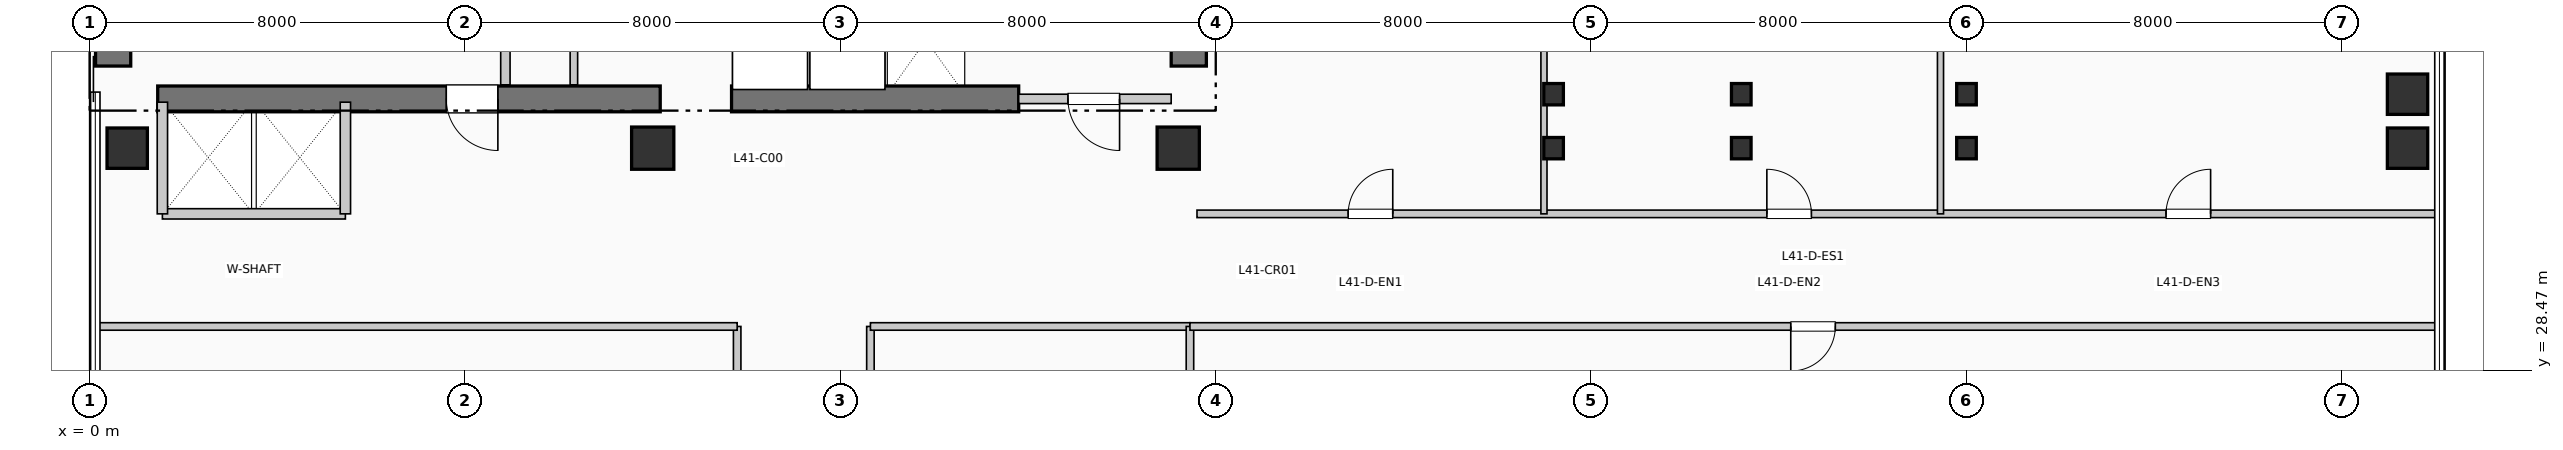
"""IFC4 building model, lengths in metres.
Left out: names, types, materials, properties, quantities, classifications, styles, units other than length and angle.
Written with IfcOpenShell. Run it as: python <this file> out.ifc"""

import sys

from ifc_helpers import new_model, si_unit, direction, frame, frame_2d, origin, origin_2d, place, context, subcontext, project, spatial, rectangle, i_section, extrude, element, fill, save


model = new_model("IFC4")
c1 = context("Model", 3, precision=1e-05, world=origin(), true_north=direction((0.0, 1.0)))
c2 = subcontext(c1, "Body", "Model", "MODEL_VIEW")
j1 = project(units=[si_unit("LENGTHUNIT", "METRE"), si_unit("PLANEANGLEUNIT", "RADIAN")], contexts=[c1])
p1 = place(None, origin())
s1 = spatial("IfcSite", under=j1, at=p1, CompositionType="ELEMENT")
p2 = place(p1, origin())
s2 = spatial("IfcBuilding", under=s1, at=p2, CompositionType="ELEMENT")
p3 = place(p2, frame((0.0, 0.0, 170.61)))
s3 = spatial("IfcBuildingStorey", under=s2, at=p3, CompositionType="ELEMENT", Elevation=170.61)
p4 = place(p3, frame((0.5, 34.95, 0.0), z_axis=(0.0, 0.0, 1.0), x_axis=(0.0, 1.0, 0.0)))
e1 = element("IfcWall", 1, at=p4, inside=s3, PredefinedType="SHEAR", context=c2, shape_type="SweptSolid", body=[
    extrude(rectangle(XDim=7.9, YDim=0.75, at=frame_2d((3.95, 0.0))), origin(), (0.0, 0.0, 1.0), 3.96),
])
p5 = place(p3, frame((23.425, 34.95, 0.0), z_axis=(0.0, 0.0, 1.0), x_axis=(0.0, 1.0, 0.0)))
e2 = element("IfcWall", 2, at=p5, inside=s3, PredefinedType="SHEAR", context=c2, shape_type="SweptSolid", body=[
    extrude(rectangle(XDim=10.64, YDim=0.75, at=frame_2d((5.32, 0.0))), origin(), (0.0, 0.0, 1.0), 3.96),
])
p6 = place(p3, frame((1.45, 34.25, 0.0), z_axis=(0.0, 0.0, 1.0), x_axis=(1.0, 0.0, 0.0)))
e3 = element("IfcWall", 3, at=p6, inside=s3, PredefinedType="SHEAR", context=c2, shape_type="SweptSolid", body=[
    extrude(rectangle(XDim=10.71, YDim=0.55, at=frame_2d((5.355, 0.0))), origin(), (0.0, 0.0, 1.0), 3.96),
])
p7 = place(p6, frame((7.25, 0.0, 0.0), z_axis=(0.0, 0.0, 1.0), x_axis=(-1.0, 0.0, 0.0)))
e4 = element("IfcOpeningElement", 4, at=p7, cuts=e3, PredefinedType="OPENING", context=c2, shape_type="SweptSolid", body=[
    extrude(rectangle(XDim=1.1, YDim=2.15, at=frame_2d((0.55, 1.075))), frame((0.0, 0.285, 0.0), z_axis=(0.0, -1.0, 0.0), x_axis=(1.0, 0.0, 0.0)), (0.0, 0.0, 1.0), 0.57),
])
p8 = place(p3, frame((13.68, 34.25, 0.0), z_axis=(0.0, 0.0, 1.0), x_axis=(1.0, 0.0, 0.0)))
e5 = element("IfcWall", 5, at=p8, inside=s3, PredefinedType="SHEAR", context=c2, shape_type="SweptSolid", body=[
    extrude(rectangle(XDim=6.12, YDim=0.55, at=frame_2d((3.06, 0.0))), origin(), (0.0, 0.0, 1.0), 3.96),
])
p9 = place(p3, frame((0.8, 33.2, 0.0), z_axis=(0.0, 0.0, 1.0), x_axis=(1.0, 0.0, 0.0)))
e6 = element("IfcColumn", 6, at=p9, inside=s3, PredefinedType="COLUMN", context=c2, shape_type="SweptSolid", body=[
    extrude(rectangle(XDim=0.86, YDim=0.86, at=origin_2d()), origin(), (0.0, 0.0, 1.0), 3.96),
])
for number, where, z_axis, x_axis in (
    (7, (12.0, 33.2, 0.0), (0.0, 0.0, 1.0), (1.0, 0.0, 0.0)),
    (8, (23.2, 33.2, 0.0), (0.0, 0.0, 1.0), (1.0, 0.0, 0.0)),
):
    element("IfcColumn", number, at=place(p3, frame(where, z_axis=z_axis, x_axis=x_axis)), inside=s3, PredefinedType="COLUMN", context=c2, shape_type="SweptSolid", body=[
        extrude(rectangle(XDim=0.9, YDim=0.9, at=origin_2d()), origin(), (0.0, 0.0, 1.0), 3.96),
    ])
for number, where, z_axis, x_axis in (
    (9, (31.2, 33.2, 0.0), (0.0, 0.0, 1.0), (1.0, 0.0, 0.0)),
    (10, (31.2, 34.35, 0.0), (0.0, 0.0, 1.0), (1.0, 0.0, 0.0)),
    (11, (35.2, 33.2, 0.0), (0.0, 0.0, 1.0), (1.0, 0.0, 0.0)),
    (12, (35.2, 34.35, 0.0), (0.0, 0.0, 1.0), (1.0, 0.0, 0.0)),
    (13, (40.0, 33.2, 0.0), (0.0, 0.0, 1.0), (1.0, 0.0, 0.0)),
    (14, (40.0, 34.35, 0.0), (0.0, 0.0, 1.0), (1.0, 0.0, 0.0)),
):
    element("IfcColumn", number, at=place(p3, frame(where, z_axis=z_axis, x_axis=x_axis)), inside=s3, PredefinedType="COLUMN", context=c2, shape_type="SweptSolid", body=[
        extrude(i_section(OverallWidth=0.418, OverallDepth=0.455, WebThickness=0.032, FlangeThickness=0.051, at=origin_2d()), origin(), (0.0, 0.0, 1.0), 3.96),
    ])
for number, where, z_axis, x_axis in (
    (15, (49.4, 33.2, 0.0), (0.0, 0.0, 1.0), (1.0, 0.0, 0.0)),
    (16, (49.4, 34.35, 0.0), (0.0, 0.0, 1.0), (1.0, 0.0, 0.0)),
):
    element("IfcColumn", number, at=place(p3, frame(where, z_axis=z_axis, x_axis=x_axis)), inside=s3, PredefinedType="COLUMN", context=c2, shape_type="SweptSolid", body=[
        extrude(rectangle(XDim=0.86, YDim=0.86, at=origin_2d()), origin(), (0.0, 0.0, 1.0), 3.96),
    ])
p10 = place(p3, frame((8.86, 34.55, 0.0), z_axis=(0.0, 0.0, 1.0), x_axis=(0.0, 1.0, 0.0)))
e17 = element("IfcWall", 17, at=p10, inside=s3, PredefinedType="PARTITIONING", context=c2, shape_type="SweptSolid", body=[
    extrude(rectangle(XDim=2.5, YDim=0.2, at=frame_2d((1.25, 0.0))), origin(), (0.0, 0.0, 1.0), 3.61),
])
p11 = place(p3, frame((19.8, 34.25, 0.0), z_axis=(0.0, 0.0, 1.0), x_axis=(1.0, 0.0, 0.0)))
e18 = element("IfcWall", 18, at=p11, inside=s3, PredefinedType="PARTITIONING", context=c2, shape_type="SweptSolid", body=[
    extrude(rectangle(XDim=3.25, YDim=0.2, at=frame_2d((1.625, 0.0))), origin(), (0.0, 0.0, 1.0), 3.61),
])
p12 = place(p11, frame((2.15, 0.0, 0.0), z_axis=(0.0, 0.0, 1.0), x_axis=(-1.0, 0.0, 0.0)))
e19 = element("IfcOpeningElement", 19, at=p12, cuts=e18, PredefinedType="OPENING", context=c2, shape_type="SweptSolid", body=[
    extrude(rectangle(XDim=1.1, YDim=2.15, at=frame_2d((0.55, 1.075))), frame((0.0, 0.11, 0.0), z_axis=(0.0, -1.0, 0.0), x_axis=(1.0, 0.0, 0.0)), (0.0, 0.0, 1.0), 0.22),
])
p13 = place(p3, frame((1.55, 31.8, 0.0), z_axis=(0.0, 0.0, 1.0), x_axis=(1.0, 0.0, 0.0)))
e20 = element("IfcWall", 20, at=p13, inside=s3, PredefinedType="PARTITIONING", context=c2, shape_type="SweptSolid", body=[
    extrude(rectangle(XDim=3.9, YDim=0.22, at=frame_2d((1.95, 0.0))), origin(), (0.0, 0.0, 1.0), 3.61),
])
for number, where, z_axis, x_axis in (
    (21, (1.55, 31.8, 0.0), (0.0, 0.0, 1.0), (0.0, 1.0, 0.0)),
    (22, (5.45, 31.8, 0.0), (0.0, 0.0, 1.0), (0.0, 1.0, 0.0)),
):
    element("IfcWall", number, at=place(p3, frame(where, z_axis=z_axis, x_axis=x_axis)), inside=s3, PredefinedType="PARTITIONING", context=c2, shape_type="SweptSolid", body=[
        extrude(rectangle(XDim=2.38, YDim=0.22, at=frame_2d((1.19, 0.0))), origin(), (0.0, 0.0, 1.0), 3.61),
    ])
p14 = place(p3, frame((10.32, 34.55, 0.0), z_axis=(0.0, 0.0, 1.0), x_axis=(0.0, 1.0, 0.0)))
e23 = element("IfcWall", 23, at=p14, inside=s3, PredefinedType="PARTITIONING", context=c2, shape_type="SweptSolid", body=[
    extrude(rectangle(XDim=2.15, YDim=0.16, at=frame_2d((1.075, 0.0))), origin(), (0.0, 0.0, 1.0), 3.61),
])
p15 = place(p3, frame((13.8, 7.2, 0.0), z_axis=(0.0, 0.0, 1.0), x_axis=(0.0, 1.0, 0.0)))
e24 = element("IfcWall", 24, at=p15, inside=s3, PredefinedType="PARTITIONING", context=c2, shape_type="SweptSolid", body=[
    extrude(rectangle(XDim=22.2, YDim=0.16, at=frame_2d((11.1, 0.0))), origin(), (0.0, 0.0, 1.0), 3.61),
])
p16 = place(p15, frame((4.36, 0.0, 0.0), z_axis=(0.0, 0.0, 1.0), x_axis=(-1.0, 0.0, 0.0)))
e25 = element("IfcOpeningElement", 25, at=p16, cuts=e24, PredefinedType="OPENING", context=c2, shape_type="SweptSolid", body=[
    extrude(rectangle(XDim=0.95, YDim=2.15, at=frame_2d((0.475, 1.075))), frame((0.0, 0.09, 0.0), z_axis=(0.0, -1.0, 0.0), x_axis=(1.0, 0.0, 0.0)), (0.0, 0.0, 1.0), 0.18),
])
p17 = place(p15, frame((12.13, 0.0, 0.0), z_axis=(0.0, 0.0, 1.0), x_axis=(-1.0, 0.0, 0.0)))
e26 = element("IfcOpeningElement", 26, at=p17, cuts=e24, PredefinedType="OPENING", context=c2, shape_type="SweptSolid", body=[
    extrude(rectangle(XDim=0.95, YDim=2.15, at=frame_2d((0.475, 1.075))), frame((0.0, 0.09, 0.0), z_axis=(0.0, -1.0, 0.0), x_axis=(1.0, 0.0, 0.0)), (0.0, 0.0, 1.0), 0.18),
])
p18 = place(p15, frame((19.345, 0.0, 0.0), z_axis=(0.0, 0.0, 1.0), x_axis=(-1.0, 0.0, 0.0)))
e27 = element("IfcOpeningElement", 27, at=p18, cuts=e24, PredefinedType="OPENING", context=c2, shape_type="SweptSolid", body=[
    extrude(rectangle(XDim=0.95, YDim=2.15, at=frame_2d((0.475, 1.075))), frame((0.0, 0.09, 0.0), z_axis=(0.0, -1.0, 0.0), x_axis=(1.0, 0.0, 0.0)), (0.0, 0.0, 1.0), 0.18),
])
p19 = place(p3, frame((16.64, 7.2, 0.0), z_axis=(0.0, 0.0, 1.0), x_axis=(0.0, 1.0, 0.0)))
e28 = element("IfcWall", 28, at=p19, inside=s3, PredefinedType="PARTITIONING", context=c2, shape_type="SweptSolid", body=[
    extrude(rectangle(XDim=22.2, YDim=0.16, at=frame_2d((11.1, 0.0))), origin(), (0.0, 0.0, 1.0), 3.61),
])
p20 = place(p19, frame((10.625, 0.0, 0.0)))
e29 = element("IfcOpeningElement", 29, at=p20, cuts=e28, PredefinedType="OPENING", context=c2, shape_type="SweptSolid", body=[
    extrude(rectangle(XDim=0.95, YDim=2.15, at=frame_2d((0.475, 1.075))), frame((0.0, 0.09, 0.0), z_axis=(0.0, -1.0, 0.0), x_axis=(1.0, 0.0, 0.0)), (0.0, 0.0, 1.0), 0.18),
])
p21 = place(p3, frame((0.19, 29.4, 0.0), z_axis=(0.0, 0.0, 1.0), x_axis=(1.0, 0.0, 0.0)))
e30 = element("IfcWall", 30, at=p21, inside=s3, PredefinedType="PARTITIONING", context=c2, shape_type="SweptSolid", body=[
    extrude(rectangle(XDim=13.61, YDim=0.16, at=frame_2d((6.805, 0.0))), origin(), (0.0, 0.0, 1.0), 3.265),
])
p22 = place(p3, frame((16.64, 29.4, 0.0), z_axis=(0.0, 0.0, 1.0), x_axis=(1.0, 0.0, 0.0)))
e31 = element("IfcWall", 31, at=p22, inside=s3, PredefinedType="PARTITIONING", context=c2, shape_type="SweptSolid", body=[
    extrude(rectangle(XDim=6.81, YDim=0.16, at=frame_2d((3.405, 0.0))), origin(), (0.0, 0.0, 1.0), 3.61),
])
p23 = place(p3, frame((23.45, 0.19, 0.0), z_axis=(0.0, 0.0, 1.0), x_axis=(0.0, 1.0, 0.0)))
e32 = element("IfcWall", 32, at=p23, inside=s3, PredefinedType="PARTITIONING", context=c2, shape_type="SweptSolid", body=[
    extrude(rectangle(XDim=29.21, YDim=0.16, at=frame_2d((14.605, 0.0))), origin(), (0.0, 0.0, 1.0), 2.945),
])
p24 = place(p3, frame((23.45, 29.4, 0.0), z_axis=(0.0, 0.0, 1.0), x_axis=(1.0, 0.0, 0.0)))
e33 = element("IfcWall", 33, at=p24, inside=s3, PredefinedType="PARTITIONING", context=c2, shape_type="SweptSolid", body=[
    extrude(rectangle(XDim=26.56, YDim=0.16, at=frame_2d((13.28, 0.0))), origin(), (0.0, 0.0, 1.0), 3.265),
])
p25 = place(p24, frame((13.755, 0.0, 0.0), z_axis=(0.0, 0.0, 1.0), x_axis=(-1.0, 0.0, 0.0)))
e34 = element("IfcOpeningElement", 34, at=p25, cuts=e33, PredefinedType="OPENING", context=c2, shape_type="SweptSolid", body=[
    extrude(rectangle(XDim=0.95, YDim=2.15, at=frame_2d((0.475, 1.075))), frame((0.0, 0.09, 0.0), z_axis=(0.0, -1.0, 0.0), x_axis=(1.0, 0.0, 0.0)), (0.0, 0.0, 1.0), 0.18),
])
p26 = place(p3, frame((23.6, 31.8, 0.0), z_axis=(0.0, 0.0, 1.0), x_axis=(1.0, 0.0, 0.0)))
e35 = element("IfcWall", 35, at=p26, inside=s3, PredefinedType="PARTITIONING", context=c2, shape_type="SweptSolid", body=[
    extrude(rectangle(XDim=26.41, YDim=0.16, at=frame_2d((13.205, 0.0))), origin(), (0.0, 0.0, 1.0), 3.61),
])
p27 = place(p26, frame((3.222, 0.0, 0.0)))
e36 = element("IfcOpeningElement", 36, at=p27, cuts=e35, PredefinedType="OPENING", context=c2, shape_type="SweptSolid", body=[
    extrude(rectangle(XDim=0.95, YDim=2.15, at=frame_2d((0.475, 1.075))), frame((0.0, 0.09, 0.0), z_axis=(0.0, -1.0, 0.0), x_axis=(1.0, 0.0, 0.0)), (0.0, 0.0, 1.0), 0.18),
])
p28 = place(p26, frame((12.146, 0.0, 0.0)))
e37 = element("IfcOpeningElement", 37, at=p28, cuts=e35, PredefinedType="OPENING", context=c2, shape_type="SweptSolid", body=[
    extrude(rectangle(XDim=0.95, YDim=2.15, at=frame_2d((0.475, 1.075))), frame((0.0, 0.09, 0.0), z_axis=(0.0, -1.0, 0.0), x_axis=(1.0, 0.0, 0.0)), (0.0, 0.0, 1.0), 0.18),
])
p29 = place(p26, frame((20.653, 0.0, 0.0)))
e38 = element("IfcOpeningElement", 38, at=p29, cuts=e35, PredefinedType="OPENING", context=c2, shape_type="SweptSolid", body=[
    extrude(rectangle(XDim=0.95, YDim=2.15, at=frame_2d((0.475, 1.075))), frame((0.0, 0.09, 0.0), z_axis=(0.0, -1.0, 0.0), x_axis=(1.0, 0.0, 0.0)), (0.0, 0.0, 1.0), 0.18),
])
p30 = place(p3, frame((30.995, 31.8, 0.0), z_axis=(0.0, 0.0, 1.0), x_axis=(0.0, 1.0, 0.0)))
e39 = element("IfcWall", 39, at=p30, inside=s3, PredefinedType="PARTITIONING", context=c2, shape_type="SweptSolid", body=[
    extrude(rectangle(XDim=14.01, YDim=0.13, at=frame_2d((7.005, 0.0))), origin(), (0.0, 0.0, 1.0), 2.945),
])
p31 = place(p3, frame((39.446, 31.8, 0.0), z_axis=(0.0, 0.0, 1.0), x_axis=(0.0, 1.0, 0.0)))
e40 = element("IfcWall", 40, at=p31, inside=s3, PredefinedType="PARTITIONING", context=c2, shape_type="SweptSolid", body=[
    extrude(rectangle(XDim=14.01, YDim=0.13, at=frame_2d((7.005, 0.0))), origin(), (0.0, 0.0, 1.0), 3.61),
])
p32 = place(p7, origin())
e41 = element("IfcDoor", 41, at=p32, inside=s3, OperationType="SINGLE_SWING_RIGHT", PredefinedType="DOOR", context=c2, shape_type="SweptSolid", body=[
    extrude(rectangle(XDim=1.1, YDim=2.15, at=frame_2d((0.55, 1.075))), frame((0.0, 0.025, 0.0), z_axis=(0.0, -1.0, 0.0), x_axis=(1.0, 0.0, 0.0)), (0.0, 0.0, 1.0), 0.05),
])
fill(e4, e41)
p33 = place(p12, origin())
e42 = element("IfcDoor", 42, at=p33, inside=s3, OperationType="SINGLE_SWING_RIGHT", PredefinedType="DOOR", context=c2, shape_type="SweptSolid", body=[
    extrude(rectangle(XDim=1.1, YDim=2.15, at=frame_2d((0.55, 1.075))), frame((0.0, 0.025, 0.0), z_axis=(0.0, -1.0, 0.0), x_axis=(1.0, 0.0, 0.0)), (0.0, 0.0, 1.0), 0.05),
])
fill(e19, e42)
p34 = place(p25, origin())
e43 = element("IfcDoor", 43, at=p34, inside=s3, OperationType="SINGLE_SWING_LEFT", PredefinedType="DOOR", context=c2, shape_type="SweptSolid", body=[
    extrude(rectangle(XDim=0.95, YDim=2.15, at=frame_2d((0.475, 1.075))), frame((0.0, 0.025, 0.0), z_axis=(0.0, -1.0, 0.0), x_axis=(1.0, 0.0, 0.0)), (0.0, 0.0, 1.0), 0.05),
])
fill(e34, e43)
p35 = place(p27, origin())
e44 = element("IfcDoor", 44, at=p35, inside=s3, OperationType="SINGLE_SWING_RIGHT", PredefinedType="DOOR", context=c2, shape_type="SweptSolid", body=[
    extrude(rectangle(XDim=0.95, YDim=2.15, at=frame_2d((0.475, 1.075))), frame((0.0, 0.025, 0.0), z_axis=(0.0, -1.0, 0.0), x_axis=(1.0, 0.0, 0.0)), (0.0, 0.0, 1.0), 0.05),
])
fill(e36, e44)
p36 = place(p28, origin())
e45 = element("IfcDoor", 45, at=p36, inside=s3, OperationType="SINGLE_SWING_LEFT", PredefinedType="DOOR", context=c2, shape_type="SweptSolid", body=[
    extrude(rectangle(XDim=0.95, YDim=2.15, at=frame_2d((0.475, 1.075))), frame((0.0, 0.025, 0.0), z_axis=(0.0, -1.0, 0.0), x_axis=(1.0, 0.0, 0.0)), (0.0, 0.0, 1.0), 0.05),
])
fill(e37, e45)
p37 = place(p29, origin())
e46 = element("IfcDoor", 46, at=p37, inside=s3, OperationType="SINGLE_SWING_RIGHT", PredefinedType="DOOR", context=c2, shape_type="SweptSolid", body=[
    extrude(rectangle(XDim=0.95, YDim=2.15, at=frame_2d((0.475, 1.075))), frame((0.0, 0.025, 0.0), z_axis=(0.0, -1.0, 0.0), x_axis=(1.0, 0.0, 0.0)), (0.0, 0.0, 1.0), 0.05),
])
fill(e38, e46)
save(model, sys.argv[1])
